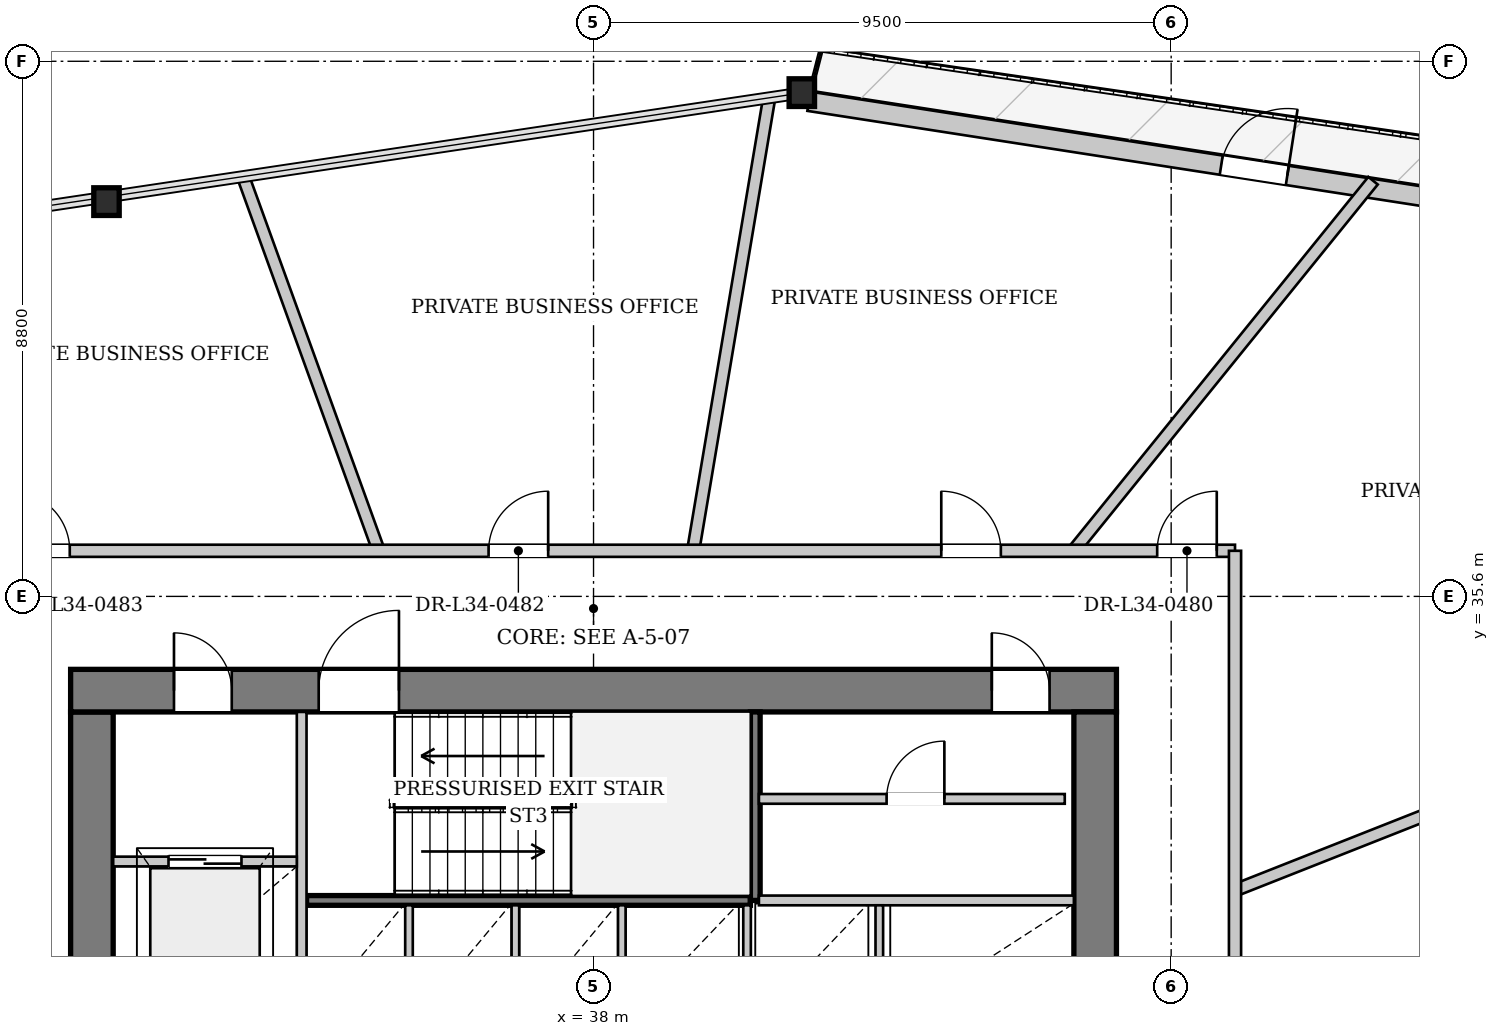
"""IFC4 building model, lengths in metres.
Left out: names, types, materials, properties, quantities, classifications, styles, units other than length and angle.
Written with IfcOpenShell. Run it as: python <this file> out.ifc"""

import sys

from ifc_helpers import new_model, si_unit, direction, frame, frame_2d, origin, origin_2d, place, context, subcontext, project, spatial, rectangle, i_section, extrude, source, transform, mapped, element, fill, save


model = new_model("IFC4")
c1 = context("Model", 3, precision=1e-05, world=origin(), true_north=direction((0.0, 1.0)))
c2 = subcontext(c1, "Body", "Model", "MODEL_VIEW")
j1 = project(units=[si_unit("LENGTHUNIT", "METRE"), si_unit("PLANEANGLEUNIT", "RADIAN")], contexts=[c1])
p1 = place(None, origin())
s1 = spatial("IfcSite", under=j1, at=p1, CompositionType="ELEMENT")
p2 = place(p1, origin())
s2 = spatial("IfcBuilding", under=s1, at=p2, CompositionType="ELEMENT")
p3 = place(p2, frame((0.0, 0.0, 130.55)))
s3 = spatial("IfcBuildingStorey", under=s2, at=p3, CompositionType="ELEMENT", Elevation=130.55)
m1 = source(origin(), c2, "Body", "SweptSolid", [
    extrude(i_section(OverallWidth=0.418, OverallDepth=0.455, WebThickness=0.038, FlangeThickness=0.059, at=origin_2d()), origin(), (0.0, 0.0, 1.0), 3.397),
])
p4 = place(p3, frame((41.566, 43.901, 0.0), z_axis=(-0.082512335001, -0.009487481028, 0.996544882219), x_axis=(0.114229941236, -0.993454337413, 0.0)))
e1 = element("IfcColumn", 1, at=p4, inside=s3, PredefinedType="COLUMN", context=c2, shape_type="MappedRepresentation", body=[
    mapped(m1, transform((0.0, 0.0, 0.0), x_axis=(1.0, 0.0, 0.0), y_axis=(0.0, 1.0, 0.0), z_axis=(0.0, 0.0, 1.0), scale=1.0)),
])
m2 = source(origin(), c2, "Body", "SweptSolid", [
    extrude(i_section(OverallWidth=0.418, OverallDepth=0.455, WebThickness=0.038, FlangeThickness=0.059, at=origin_2d()), origin(), (0.0, 0.0, 1.0), 3.399),
])
p5 = place(p3, frame((30.11, 42.186, 0.0), z_axis=(-0.07068503957, -0.054953308203, 0.995983814677), x_axis=(0.613773964369, -0.78948180515, 0.0)))
e2 = element("IfcColumn", 2, at=p5, inside=s3, PredefinedType="COLUMN", context=c2, shape_type="MappedRepresentation", body=[
    mapped(m2, transform((0.0, 0.0, 0.0), x_axis=(1.0, 0.0, 0.0), y_axis=(0.0, 1.0, 0.0), z_axis=(0.0, 0.0, 1.0), scale=1.0)),
])
p6 = place(p3, frame((41.541, 43.743, 0.0), z_axis=(0.0, 0.0, 1.0), x_axis=(0.988207138031, -0.153122997436, 0.0)))
e3 = element("IfcWall", 3, at=p6, inside=s3, PredefinedType="SOLIDWALL", context=c2, shape_type="SweptSolid", body=[
    extrude(rectangle(XDim=23.167, YDim=0.32, at=frame_2d((11.583, 0.0))), origin(), (0.0, 0.0, 1.0), 2.692),
])
p7 = place(p6, frame((6.863, 0.0, 0.0)))
e4 = element("IfcOpeningElement", 4, at=p7, cuts=e3, PredefinedType="OPENING", context=c2, shape_type="SweptSolid", body=[
    extrude(rectangle(XDim=1.1, YDim=2.3, at=frame_2d((0.55, 1.15))), frame((0.0, 0.17, 0.0), z_axis=(0.0, -1.0, 0.0), x_axis=(1.0, 0.0, 0.0)), (0.0, 0.0, 1.0), 0.34),
])
p8 = place(p6, frame((16.243, 0.0, 0.372)))
e5 = element("IfcOpeningElement", 5, at=p8, cuts=e3, PredefinedType="OPENING", context=c2, shape_type="SweptSolid", body=[
    extrude(rectangle(XDim=1.8, YDim=2.2, at=frame_2d((0.9, 1.1))), frame((0.0, 0.17, 0.0), z_axis=(0.0, -1.0, 0.0), x_axis=(1.0, 0.0, 0.0)), (0.0, 0.0, 1.0), 0.34),
])
p9 = place(p3, frame((29.75, 19.5, 0.0), z_axis=(0.0, 0.0, 1.0), x_axis=(0.0, 1.0, 0.0)))
e6 = element("IfcWall", 6, at=p9, inside=s3, PredefinedType="SHEAR", context=c2, shape_type="SweptSolid", body=[
    extrude(rectangle(XDim=14.2, YDim=0.7, at=frame_2d((7.1, 0.0))), origin(), (0.0, 0.0, 1.0), 3.3),
])
p10 = place(p9, frame((7.42, 0.0, 0.0)))
e7 = element("IfcOpeningElement", 7, at=p10, cuts=e6, PredefinedType="OPENING", context=c2, shape_type="SweptSolid", body=[
    extrude(rectangle(XDim=1.6, YDim=2.2, at=frame_2d((0.8, 1.1))), frame((0.0, 0.36, 0.0), z_axis=(0.0, -1.0, 0.0), x_axis=(1.0, 0.0, 0.0)), (0.0, 0.0, 1.0), 0.72),
])
p11 = place(p3, frame((29.4, 34.05, 0.0), z_axis=(0.0, 0.0, 1.0), x_axis=(1.0, 0.0, 0.0)))
e8 = element("IfcWall", 8, at=p11, inside=s3, PredefinedType="SHEAR", context=c2, shape_type="SweptSolid", body=[
    extrude(rectangle(XDim=17.2, YDim=0.7, at=frame_2d((8.6, 0.0))), origin(), (0.0, 0.0, 1.0), 3.3),
])
p12 = place(p11, frame((1.7, 0.0, 0.0)))
e9 = element("IfcOpeningElement", 9, at=p12, cuts=e8, PredefinedType="OPENING", context=c2, shape_type="SweptSolid", body=[
    extrude(rectangle(XDim=0.95, YDim=2.1, at=frame_2d((0.475, 1.05))), frame((0.0, 0.36, 0.0), z_axis=(0.0, -1.0, 0.0), x_axis=(1.0, 0.0, 0.0)), (0.0, 0.0, 1.0), 0.72),
])
p13 = place(p11, frame((4.08, 0.0, 0.0)))
e10 = element("IfcOpeningElement", 10, at=p13, cuts=e8, PredefinedType="OPENING", context=c2, shape_type="SweptSolid", body=[
    extrude(rectangle(XDim=1.32, YDim=2.2, at=frame_2d((0.66, 1.1))), frame((0.0, 0.36, 0.0), z_axis=(0.0, -1.0, 0.0), x_axis=(1.0, 0.0, 0.0)), (0.0, 0.0, 1.0), 0.72),
])
p14 = place(p11, frame((15.15, 0.0, 0.0)))
e11 = element("IfcOpeningElement", 11, at=p14, cuts=e8, PredefinedType="OPENING", context=c2, shape_type="SweptSolid", body=[
    extrude(rectangle(XDim=0.95, YDim=2.1, at=frame_2d((0.475, 1.05))), frame((0.0, 0.36, 0.0), z_axis=(0.0, -1.0, 0.0), x_axis=(1.0, 0.0, 0.0)), (0.0, 0.0, 1.0), 0.72),
])
p15 = place(p3, frame((46.25, 33.7, 0.0), z_axis=(0.0, 0.0, 1.0), x_axis=(0.0, -1.0, 0.0)))
e12 = element("IfcWall", 12, at=p15, inside=s3, PredefinedType="SHEAR", context=c2, shape_type="SweptSolid", body=[
    extrude(rectangle(XDim=14.2, YDim=0.7, at=frame_2d((7.1, 0.0))), origin(), (0.0, 0.0, 1.0), 3.3),
])
p16 = place(p15, frame((5.18, 0.0, 0.0)))
e13 = element("IfcOpeningElement", 13, at=p16, cuts=e12, PredefinedType="OPENING", context=c2, shape_type="SweptSolid", body=[
    extrude(rectangle(XDim=1.6, YDim=2.2, at=frame_2d((0.8, 1.1))), frame((0.0, 0.36, 0.0), z_axis=(0.0, -1.0, 0.0), x_axis=(1.0, 0.0, 0.0)), (0.0, 0.0, 1.0), 0.72),
])
p17 = place(p3, frame((33.28, 30.6, 0.0), z_axis=(0.0, 0.0, 1.0), x_axis=(1.0, 0.0, 0.0)))
e14 = element("IfcWall", 14, at=p17, inside=s3, PredefinedType="PARTITIONING", context=c2, shape_type="SweptSolid", body=[
    extrude(rectangle(XDim=7.3, YDim=0.16, at=frame_2d((3.65, 0.0))), origin(), (0.0, 0.0, 1.0), 3.3),
])
p18 = place(p3, frame((40.66, 30.6, 0.0), z_axis=(0.0, 0.0, 1.0), x_axis=(0.0, 1.0, 0.0)))
e15 = element("IfcWall", 15, at=p18, inside=s3, PredefinedType="PARTITIONING", context=c2, shape_type="SweptSolid", body=[
    extrude(rectangle(XDim=3.1, YDim=0.16, at=frame_2d((1.55, 0.0))), origin(), (0.0, 0.0, 1.0), 3.3),
])
p19 = place(p3, frame((33.2, 28.44, 0.0), z_axis=(0.0, 0.0, 1.0), x_axis=(0.0, 1.0, 0.0)))
e16 = element("IfcWall", 16, at=p19, inside=s3, PredefinedType="PARTITIONING", context=c2, shape_type="SweptSolid", body=[
    extrude(rectangle(XDim=5.26, YDim=0.16, at=frame_2d((2.63, 0.0))), origin(), (0.0, 0.0, 1.0), 3.3),
])
p20 = place(p3, frame((30.1, 31.24, 0.0), z_axis=(0.0, 0.0, 1.0), x_axis=(1.0, 0.0, 0.0)))
e17 = element("IfcWall", 17, at=p20, inside=s3, PredefinedType="PARTITIONING", context=c2, shape_type="SweptSolid", body=[
    extrude(rectangle(XDim=3.02, YDim=0.16, at=frame_2d((1.51, 0.0))), origin(), (0.0, 0.0, 1.0), 3.3),
])
p21 = place(p20, frame((0.91, 0.0, 0.0)))
e18 = element("IfcOpeningElement", 18, at=p21, cuts=e17, PredefinedType="OPENING", context=c2, shape_type="SweptSolid", body=[
    extrude(rectangle(XDim=1.2, YDim=2.2, at=frame_2d((0.6, 1.1))), frame((0.0, 0.09, 0.0), z_axis=(0.0, -1.0, 0.0), x_axis=(1.0, 0.0, 0.0)), (0.0, 0.0, 1.0), 0.18),
])
p22 = place(p3, frame((40.72, 30.6, 0.0), z_axis=(0.0, 0.0, 1.0), x_axis=(1.0, 0.0, 0.0)))
e19 = element("IfcWall", 19, at=p22, inside=s3, PredefinedType="PARTITIONING", context=c2, shape_type="SweptSolid", body=[
    extrude(rectangle(XDim=5.18, YDim=0.16, at=frame_2d((2.59, 0.0))), origin(), (0.0, 0.0, 1.0), 3.3),
])
for number, where, z_axis, x_axis in (
    (20, (34.965, 28.6, 0.0), (0.0, 0.0, 1.0), (0.0, 1.0, 0.0)),
    (21, (36.715, 28.6, 0.0), (0.0, 0.0, 1.0), (0.0, 1.0, 0.0)),
    (22, (38.465, 28.6, 0.0), (0.0, 0.0, 1.0), (0.0, 1.0, 0.0)),
    (23, (40.525, 28.6, 0.0), (0.0, 0.0, 1.0), (0.0, 1.0, 0.0)),
    (24, (42.7, 28.6, 0.0), (0.0, 0.0, 1.0), (0.0, 1.0, 0.0)),
):
    element("IfcWall", number, at=place(p3, frame(where, z_axis=z_axis, x_axis=x_axis)), inside=s3, PredefinedType="PARTITIONING", context=c2, shape_type="SweptSolid", body=[
        extrude(rectangle(XDim=1.92, YDim=0.125, at=frame_2d((0.96, 0.0))), origin(), (0.0, 0.0, 1.0), 3.3),
    ])
p23 = place(p3, frame((40.72, 32.27, 0.0), z_axis=(0.0, 0.0, 1.0), x_axis=(1.0, 0.0, 0.0)))
e25 = element("IfcWall", 25, at=p23, inside=s3, PredefinedType="PARTITIONING", context=c2, shape_type="SweptSolid", body=[
    extrude(rectangle(XDim=5.03, YDim=0.16, at=frame_2d((2.515, 0.0))), origin(), (0.0, 0.0, 1.0), 3.3),
])
p24 = place(p23, frame((2.1, 0.0, 0.0)))
e26 = element("IfcOpeningElement", 26, at=p24, cuts=e25, PredefinedType="OPENING", context=c2, shape_type="SweptSolid", body=[
    extrude(rectangle(XDim=0.95, YDim=2.1, at=frame_2d((0.475, 1.05))), frame((0.0, 0.09, 0.0), z_axis=(0.0, -1.0, 0.0), x_axis=(1.0, 0.0, 0.0)), (0.0, 0.0, 1.0), 0.18),
])
p25 = place(p3, frame((48.55, 30.767, 0.0), z_axis=(0.0, 0.0, 1.0), x_axis=(0.930068002608, 0.367387412038, 0.0)))
e27 = element("IfcWall", 27, at=p25, inside=s3, PredefinedType="PARTITIONING", context=c2, shape_type="SweptSolid", body=[
    extrude(rectangle(XDim=18.396, YDim=0.2, at=frame_2d((9.198, 0.0))), origin(), (0.0, 0.0, 1.0), 2.795),
])
p26 = place(p3, frame((45.893, 36.35, 0.0), z_axis=(0.0, 0.0, 1.0), x_axis=(0.62920899099, 0.777236158229, 0.0)))
e28 = element("IfcWall", 28, at=p26, inside=s3, PredefinedType="PARTITIONING", context=c2, shape_type="SweptSolid", body=[
    extrude(rectangle(XDim=7.831, YDim=0.2, at=frame_2d((3.916, 0.0))), origin(), (0.0, 0.0, 1.0), 3.3),
])
p27 = place(p3, frame((39.638, 36.35, 0.0), z_axis=(0.0, 0.0, 1.0), x_axis=(0.165688318352, 0.986178169076, 0.0)))
e29 = element("IfcWall", 29, at=p27, inside=s3, PredefinedType="PARTITIONING", context=c2, shape_type="SweptSolid", body=[
    extrude(rectangle(XDim=7.522, YDim=0.2, at=frame_2d((3.761, 0.0))), origin(), (0.0, 0.0, 1.0), 2.785),
])
p28 = place(p3, frame((34.467, 36.35, 0.0), z_axis=(0.0, 0.0, 1.0), x_axis=(-0.340674701082, 0.940181231488, 0.0)))
e30 = element("IfcWall", 30, at=p28, inside=s3, PredefinedType="PARTITIONING", context=c2, shape_type="SweptSolid", body=[
    extrude(rectangle(XDim=6.515, YDim=0.2, at=frame_2d((3.257, 0.0))), origin(), (0.0, 0.0, 1.0), 3.3),
])
p29 = place(p3, frame((27.45, 36.35, 0.0), z_axis=(0.0, 0.0, 1.0), x_axis=(1.0, 0.0, 0.0)))
e31 = element("IfcWall", 31, at=p29, inside=s3, PredefinedType="PARTITIONING", context=c2, shape_type="SweptSolid", body=[
    extrude(rectangle(XDim=21.1, YDim=0.2, at=frame_2d((10.55, 0.0))), origin(), (0.0, 0.0, 1.0), 3.3),
])
p30 = place(p29, frame((19.82, 0.0, 0.0)))
e32 = element("IfcOpeningElement", 32, at=p30, cuts=e31, PredefinedType="OPENING", context=c2, shape_type="SweptSolid", body=[
    extrude(rectangle(XDim=0.98, YDim=2.15, at=frame_2d((0.49, 1.075))), frame((0.0, 0.11, 0.0), z_axis=(0.0, -1.0, 0.0), x_axis=(1.0, 0.0, 0.0)), (0.0, 0.0, 1.0), 0.22),
])
p31 = place(p29, frame((16.269, 0.0, 0.0)))
e33 = element("IfcOpeningElement", 33, at=p31, cuts=e31, PredefinedType="OPENING", context=c2, shape_type="SweptSolid", body=[
    extrude(rectangle(XDim=0.98, YDim=2.15, at=frame_2d((0.49, 1.075))), frame((0.0, 0.11, 0.0), z_axis=(0.0, -1.0, 0.0), x_axis=(1.0, 0.0, 0.0)), (0.0, 0.0, 1.0), 0.22),
])
p32 = place(p29, frame((8.824, 0.0, 0.0)))
e34 = element("IfcOpeningElement", 34, at=p32, cuts=e31, PredefinedType="OPENING", context=c2, shape_type="SweptSolid", body=[
    extrude(rectangle(XDim=0.98, YDim=2.15, at=frame_2d((0.49, 1.075))), frame((0.0, 0.11, 0.0), z_axis=(0.0, -1.0, 0.0), x_axis=(1.0, 0.0, 0.0)), (0.0, 0.0, 1.0), 0.22),
])
p33 = place(p29, frame((0.956, 0.0, 0.0)))
e35 = element("IfcOpeningElement", 35, at=p33, cuts=e31, PredefinedType="OPENING", context=c2, shape_type="SweptSolid", body=[
    extrude(rectangle(XDim=0.98, YDim=2.15, at=frame_2d((0.49, 1.075))), frame((0.0, 0.11, 0.0), z_axis=(0.0, -1.0, 0.0), x_axis=(1.0, 0.0, 0.0)), (0.0, 0.0, 1.0), 0.22),
])
p34 = place(p3, frame((48.55, 16.85, 0.0), z_axis=(0.0, 0.0, 1.0), x_axis=(0.0, 1.0, 0.0)))
e36 = element("IfcWall", 36, at=p34, inside=s3, PredefinedType="PARTITIONING", context=c2, shape_type="SweptSolid", body=[
    extrude(rectangle(XDim=19.5, YDim=0.2, at=frame_2d((9.75, 0.0))), origin(), (0.0, 0.0, 1.0), 3.3),
])
p35 = place(p34, frame((10.625, 0.0, 0.0)))
e37 = element("IfcOpeningElement", 37, at=p35, cuts=e36, PredefinedType="OPENING", context=c2, shape_type="SweptSolid", body=[
    extrude(rectangle(XDim=0.98, YDim=2.15, at=frame_2d((0.49, 1.075))), frame((0.0, 0.11, 0.0), z_axis=(0.0, -1.0, 0.0), x_axis=(1.0, 0.0, 0.0)), (0.0, 0.0, 1.0), 0.22),
])
p36 = place(p34, frame((2.207, 0.0, 0.0)))
e38 = element("IfcOpeningElement", 38, at=p36, cuts=e36, PredefinedType="OPENING", context=c2, shape_type="SweptSolid", body=[
    extrude(rectangle(XDim=0.98, YDim=2.15, at=frame_2d((0.49, 1.075))), frame((0.0, 0.11, 0.0), z_axis=(0.0, -1.0, 0.0), x_axis=(1.0, 0.0, 0.0)), (0.0, 0.0, 1.0), 0.22),
])
m3 = source(origin(), c2, "Body", "SweptSolid", [
    extrude(rectangle(XDim=1.1, YDim=2.3, at=frame_2d((0.55, 1.15))), frame((0.0, 0.025, 0.0), z_axis=(0.0, -1.0, 0.0), x_axis=(1.0, 0.0, 0.0)), (0.0, 0.0, 1.0), 0.05),
])
p37 = place(p7, origin())
e39 = element("IfcDoor", 39, at=p37, inside=s3, OperationType="SINGLE_SWING_RIGHT", PredefinedType="DOOR", context=c2, shape_type="MappedRepresentation", body=[
    mapped(m3, transform((0.0, 0.0, 0.0), x_axis=(1.0, 0.0, 0.0), y_axis=(0.0, 1.0, 0.0), z_axis=(0.0, 0.0, 1.0), scale=1.0)),
])
fill(e4, e39)
m4 = source(origin(), c2, "Body", "SweptSolid", [
    extrude(rectangle(XDim=0.95, YDim=2.1, at=frame_2d((0.475, 1.05))), frame((0.0, 0.025, 0.0), z_axis=(0.0, -1.0, 0.0), x_axis=(1.0, 0.0, 0.0)), (0.0, 0.0, 1.0), 0.05),
])
p38 = place(p12, origin())
e40 = element("IfcDoor", 40, at=p38, inside=s3, OperationType="SINGLE_SWING_LEFT", PredefinedType="DOOR", context=c2, shape_type="MappedRepresentation", body=[
    mapped(m4, transform((0.0, 0.0, 0.0), x_axis=(1.0, 0.0, 0.0), y_axis=(0.0, 1.0, 0.0), z_axis=(0.0, 0.0, 1.0), scale=1.0)),
])
fill(e9, e40)
m5 = source(origin(), c2, "Body", "SweptSolid", [
    extrude(rectangle(XDim=1.32, YDim=2.2, at=frame_2d((0.66, 1.1))), frame((0.0, 0.025, 0.0), z_axis=(0.0, -1.0, 0.0), x_axis=(1.0, 0.0, 0.0)), (0.0, 0.0, 1.0), 0.05),
])
p39 = place(p13, origin())
e41 = element("IfcDoor", 41, at=p39, inside=s3, OperationType="SINGLE_SWING_RIGHT", PredefinedType="DOOR", context=c2, shape_type="MappedRepresentation", body=[
    mapped(m5, transform((0.0, 0.0, 0.0), x_axis=(1.0, 0.0, 0.0), y_axis=(0.0, 1.0, 0.0), z_axis=(0.0, 0.0, 1.0), scale=1.0)),
])
fill(e10, e41)
m6 = source(origin(), c2, "Body", "SweptSolid", [
    extrude(rectangle(XDim=1.2, YDim=2.2, at=frame_2d((0.6, 1.1))), frame((0.0, 0.025, 0.0), z_axis=(0.0, -1.0, 0.0), x_axis=(1.0, 0.0, 0.0)), (0.0, 0.0, 1.0), 0.05),
])
p40 = place(p21, origin())
e42 = element("IfcDoor", 42, at=p40, inside=s3, OperationType="DOUBLE_DOOR_SLIDING", PredefinedType="DOOR", context=c2, shape_type="MappedRepresentation", body=[
    mapped(m6, transform((0.0, 0.0, 0.0), x_axis=(1.0, 0.0, 0.0), y_axis=(0.0, 1.0, 0.0), z_axis=(0.0, 0.0, 1.0), scale=1.0)),
])
fill(e18, e42)
p41 = place(p24, origin())
e43 = element("IfcDoor", 43, at=p41, inside=s3, OperationType="SINGLE_SWING_RIGHT", PredefinedType="DOOR", context=c2, shape_type="MappedRepresentation", body=[
    mapped(m4, transform((0.0, 0.0, 0.0), x_axis=(1.0, 0.0, 0.0), y_axis=(0.0, 1.0, 0.0), z_axis=(0.0, 0.0, 1.0), scale=1.0)),
])
fill(e26, e43)
p42 = place(p14, origin())
e44 = element("IfcDoor", 44, at=p42, inside=s3, OperationType="SINGLE_SWING_LEFT", PredefinedType="DOOR", context=c2, shape_type="MappedRepresentation", body=[
    mapped(m4, transform((0.0, 0.0, 0.0), x_axis=(1.0, 0.0, 0.0), y_axis=(0.0, 1.0, 0.0), z_axis=(0.0, 0.0, 1.0), scale=1.0)),
])
fill(e11, e44)
m7 = source(origin(), c2, "Body", "SweptSolid", [
    extrude(rectangle(XDim=0.98, YDim=2.15, at=frame_2d((0.49, 1.075))), frame((0.0, 0.025, 0.0), z_axis=(0.0, -1.0, 0.0), x_axis=(1.0, 0.0, 0.0)), (0.0, 0.0, 1.0), 0.05),
])
p43 = place(p30, origin())
e45 = element("IfcDoor", 45, at=p43, inside=s3, OperationType="SINGLE_SWING_RIGHT", PredefinedType="DOOR", context=c2, shape_type="MappedRepresentation", body=[
    mapped(m7, transform((0.0, 0.0, 0.0), x_axis=(1.0, 0.0, 0.0), y_axis=(0.0, 1.0, 0.0), z_axis=(0.0, 0.0, 1.0), scale=1.0)),
])
fill(e32, e45)
p44 = place(p31, origin())
e46 = element("IfcDoor", 46, at=p44, inside=s3, OperationType="SINGLE_SWING_LEFT", PredefinedType="DOOR", context=c2, shape_type="MappedRepresentation", body=[
    mapped(m7, transform((0.0, 0.0, 0.0), x_axis=(1.0, 0.0, 0.0), y_axis=(0.0, 1.0, 0.0), z_axis=(0.0, 0.0, 1.0), scale=1.0)),
])
fill(e33, e46)
p45 = place(p32, origin())
e47 = element("IfcDoor", 47, at=p45, inside=s3, OperationType="SINGLE_SWING_RIGHT", PredefinedType="DOOR", context=c2, shape_type="MappedRepresentation", body=[
    mapped(m7, transform((0.0, 0.0, 0.0), x_axis=(1.0, 0.0, 0.0), y_axis=(0.0, 1.0, 0.0), z_axis=(0.0, 0.0, 1.0), scale=1.0)),
])
fill(e34, e47)
p46 = place(p33, origin())
e48 = element("IfcDoor", 48, at=p46, inside=s3, OperationType="SINGLE_SWING_LEFT", PredefinedType="DOOR", context=c2, shape_type="MappedRepresentation", body=[
    mapped(m7, transform((0.0, 0.0, 0.0), x_axis=(1.0, 0.0, 0.0), y_axis=(0.0, 1.0, 0.0), z_axis=(0.0, 0.0, 1.0), scale=1.0)),
])
fill(e35, e48)
save(model, sys.argv[1])
